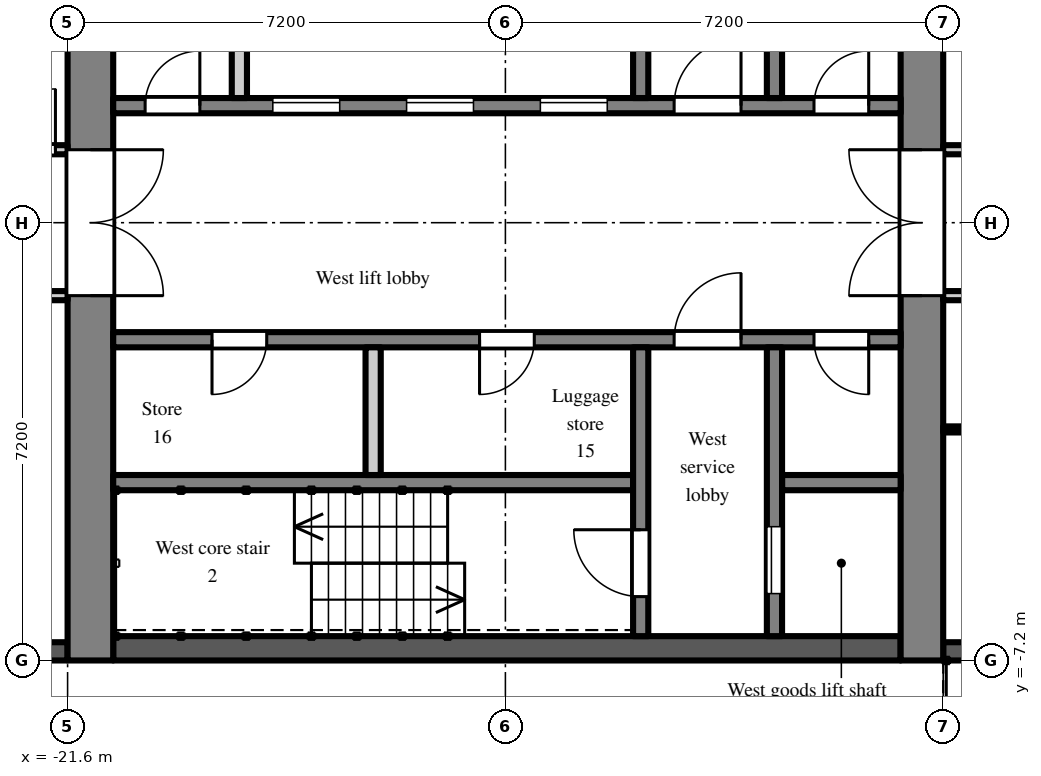
"""IFC4 building model, lengths in metres.
Left out: names, types, materials, properties, quantities, classifications, styles, units other than length and angle.
Written with IfcOpenShell. Run it as: python <this file> out.ifc"""

import sys

from ifc_helpers import new_model, si_unit, direction, frame, frame_2d, origin, place, context, subcontext, project, spatial, rectangle, extrude, element, fill, save


model = new_model("IFC4")
c1 = context("Model", 3, precision=1e-05, world=origin(), true_north=direction((0.0, 1.0)))
c2 = subcontext(c1, "Body", "Model", "MODEL_VIEW")
j1 = project(units=[si_unit("LENGTHUNIT", "METRE"), si_unit("PLANEANGLEUNIT", "RADIAN")], contexts=[c1])
p1 = place(None, origin())
s1 = spatial("IfcSite", under=j1, at=p1, CompositionType="ELEMENT")
p2 = place(p1, origin())
s2 = spatial("IfcBuilding", under=s1, at=p2, CompositionType="ELEMENT")
p3 = place(p2, frame((0.0, 0.0, 201.9)))
s3 = spatial("IfcBuildingStorey", under=s2, at=p3, CompositionType="ELEMENT", Elevation=201.9)
p4 = place(p3, frame((-24.3, -7.05, 0.0), z_axis=(0.0, 0.0, 1.0), x_axis=(1.0, 0.0, 0.0)))
e1 = element("IfcWall", 1, at=p4, inside=s3, PredefinedType="SOLIDWALL", context=c2, shape_type="SweptSolid", body=[
    extrude(rectangle(XDim=2.7, YDim=0.3, at=frame_2d((1.35, 0.0))), origin(), (0.0, 0.0, 1.0), 2.3),
])
p5 = place(p4, frame((0.75, 0.0, 0.2)))
e2 = element("IfcOpeningElement", 2, at=p5, cuts=e1, PredefinedType="OPENING", context=c2, shape_type="SweptSolid", body=[
    extrude(rectangle(XDim=1.2, YDim=1.85, at=frame_2d((0.6, 0.925))), frame((0.0, 0.16, 0.0), z_axis=(0.0, -1.0, 0.0), x_axis=(1.0, 0.0, 0.0)), (0.0, 0.0, 1.0), 0.32),
])
p6 = place(p3, frame((-7.2, -7.05, 0.0), z_axis=(0.0, 0.0, 1.0), x_axis=(1.0, 0.0, 0.0)))
e3 = element("IfcWall", 3, at=p6, inside=s3, PredefinedType="SOLIDWALL", context=c2, shape_type="SweptSolid", body=[
    extrude(rectangle(XDim=3.0, YDim=0.3, at=frame_2d((1.5, 0.0))), origin(), (0.0, 0.0, 1.0), 2.3),
])
p7 = place(p3, frame((-7.55, -7.2, 0.0), z_axis=(0.0, 0.0, 1.0), x_axis=(0.0, 1.0, 0.0)))
e4 = element("IfcWall", 4, at=p7, inside=s3, PredefinedType="SHEAR", context=c2, shape_type="SweptSolid", body=[
    extrude(rectangle(XDim=14.4, YDim=0.7, at=frame_2d((7.2, 0.0))), origin(), (0.0, 0.0, 1.0), 2.6),
])
p8 = place(p7, frame((6.0, 0.0, 0.0)))
e5 = element("IfcOpeningElement", 5, at=p8, cuts=e4, PredefinedType="OPENING", context=c2, shape_type="SweptSolid", body=[
    extrude(rectangle(XDim=2.4, YDim=2.2, at=frame_2d((1.2, 1.1))), frame((0.0, 0.36, 0.0), z_axis=(0.0, -1.0, 0.0), x_axis=(1.0, 0.0, 0.0)), (0.0, 0.0, 1.0), 0.72),
])
p9 = place(p3, frame((-21.225, -7.2, 0.0), z_axis=(0.0, 0.0, 1.0), x_axis=(0.0, 1.0, 0.0)))
e6 = element("IfcWall", 6, at=p9, inside=s3, PredefinedType="SHEAR", context=c2, shape_type="SweptSolid", body=[
    extrude(rectangle(XDim=14.4, YDim=0.75, at=frame_2d((7.2, 0.0))), origin(), (0.0, 0.0, 1.0), 2.6),
])
p10 = place(p9, frame((6.0, 0.0, 0.0)))
e7 = element("IfcOpeningElement", 7, at=p10, cuts=e6, PredefinedType="OPENING", context=c2, shape_type="SweptSolid", body=[
    extrude(rectangle(XDim=2.4, YDim=2.2, at=frame_2d((1.2, 1.1))), frame((0.0, 0.385, 0.0), z_axis=(0.0, -1.0, 0.0), x_axis=(1.0, 0.0, 0.0)), (0.0, 0.0, 1.0), 0.77),
])
p11 = place(p3, frame((-7.9, 1.925, 0.0), z_axis=(0.0, 0.0, 1.0), x_axis=(-1.0, 0.0, 0.0)))
e8 = element("IfcWall", 8, at=p11, inside=s3, PredefinedType="SHEAR", context=c2, shape_type="SweptSolid", body=[
    extrude(rectangle(XDim=12.95, YDim=0.25, at=frame_2d((6.475, 0.0))), origin(), (0.0, 0.0, 1.0), 2.6),
])
p12 = place(p11, frame((4.825, 0.0, 0.0)))
e9 = element("IfcOpeningElement", 9, at=p12, cuts=e8, PredefinedType="OPENING", context=c2, shape_type="SweptSolid", body=[
    extrude(rectangle(XDim=1.1, YDim=2.1, at=frame_2d((0.55, 1.05))), frame((0.0, 0.135, 0.0), z_axis=(0.0, -1.0, 0.0), x_axis=(1.0, 0.0, 0.0)), (0.0, 0.0, 1.0), 0.27),
])
p13 = place(p11, frame((7.025, 0.0, 0.0)))
e10 = element("IfcOpeningElement", 10, at=p13, cuts=e8, PredefinedType="OPENING", context=c2, shape_type="SweptSolid", body=[
    extrude(rectangle(XDim=1.1, YDim=2.1, at=frame_2d((0.55, 1.05))), frame((0.0, 0.135, 0.0), z_axis=(0.0, -1.0, 0.0), x_axis=(1.0, 0.0, 0.0)), (0.0, 0.0, 1.0), 0.27),
])
p14 = place(p11, frame((9.225, 0.0, 0.0)))
e11 = element("IfcOpeningElement", 11, at=p14, cuts=e8, PredefinedType="OPENING", context=c2, shape_type="SweptSolid", body=[
    extrude(rectangle(XDim=1.1, YDim=2.1, at=frame_2d((0.55, 1.05))), frame((0.0, 0.135, 0.0), z_axis=(0.0, -1.0, 0.0), x_axis=(1.0, 0.0, 0.0)), (0.0, 0.0, 1.0), 0.27),
])
p15 = place(p11, frame((0.525, 0.0, 0.0)))
e12 = element("IfcOpeningElement", 12, at=p15, cuts=e8, PredefinedType="OPENING", context=c2, shape_type="SweptSolid", body=[
    extrude(rectangle(XDim=0.9, YDim=2.1, at=frame_2d((0.45, 1.05))), frame((0.0, 0.135, 0.0), z_axis=(0.0, -1.0, 0.0), x_axis=(1.0, 0.0, 0.0)), (0.0, 0.0, 1.0), 0.27),
])
p16 = place(p11, frame((2.625, 0.0, 0.0)))
e13 = element("IfcOpeningElement", 13, at=p16, cuts=e8, PredefinedType="OPENING", context=c2, shape_type="SweptSolid", body=[
    extrude(rectangle(XDim=1.1, YDim=2.1, at=frame_2d((0.55, 1.05))), frame((0.0, 0.135, 0.0), z_axis=(0.0, -1.0, 0.0), x_axis=(1.0, 0.0, 0.0)), (0.0, 0.0, 1.0), 0.27),
])
p17 = place(p11, frame((11.525, 0.0, 0.0)))
e14 = element("IfcOpeningElement", 14, at=p17, cuts=e8, PredefinedType="OPENING", context=c2, shape_type="SweptSolid", body=[
    extrude(rectangle(XDim=0.9, YDim=2.1, at=frame_2d((0.45, 1.05))), frame((0.0, 0.135, 0.0), z_axis=(0.0, -1.0, 0.0), x_axis=(1.0, 0.0, 0.0)), (0.0, 0.0, 1.0), 0.27),
])
p18 = place(p3, frame((-9.975, 2.05, 0.0), z_axis=(0.0, 0.0, 1.0), x_axis=(0.0, 1.0, 0.0)))
e15 = element("IfcWall", 15, at=p18, inside=s3, PredefinedType="SHEAR", context=c2, shape_type="SweptSolid", body=[
    extrude(rectangle(XDim=4.75, YDim=0.25, at=frame_2d((2.375, 0.0))), origin(), (0.0, 0.0, 1.0), 2.6),
])
p19 = place(p18, frame((2.95, 0.0, 0.0)))
e16 = element("IfcOpeningElement", 16, at=p19, cuts=e15, PredefinedType="OPENING", context=c2, shape_type="SweptSolid", body=[
    extrude(rectangle(XDim=1.1, YDim=2.1, at=frame_2d((0.55, 1.05))), frame((0.0, 0.135, 0.0), z_axis=(0.0, -1.0, 0.0), x_axis=(1.0, 0.0, 0.0)), (0.0, 0.0, 1.0), 0.27),
])
p20 = place(p3, frame((-12.175, 2.05, 0.0), z_axis=(0.0, 0.0, 1.0), x_axis=(0.0, 1.0, 0.0)))
e17 = element("IfcWall", 17, at=p20, inside=s3, PredefinedType="SHEAR", context=c2, shape_type="SweptSolid", body=[
    extrude(rectangle(XDim=4.75, YDim=0.25, at=frame_2d((2.375, 0.0))), origin(), (0.0, 0.0, 1.0), 2.6),
])
p21 = place(p20, frame((3.0, 0.0, 0.0)))
e18 = element("IfcOpeningElement", 18, at=p21, cuts=e17, PredefinedType="OPENING", context=c2, shape_type="SweptSolid", body=[
    extrude(rectangle(XDim=1.1, YDim=2.1, at=frame_2d((0.55, 1.05))), frame((0.0, 0.135, 0.0), z_axis=(0.0, -1.0, 0.0), x_axis=(1.0, 0.0, 0.0)), (0.0, 0.0, 1.0), 0.27),
])
p22 = place(p3, frame((-18.775, 2.05, 0.0), z_axis=(0.0, 0.0, 1.0), x_axis=(0.0, 1.0, 0.0)))
e19 = element("IfcWall", 19, at=p22, inside=s3, PredefinedType="PARTITIONING", context=c2, shape_type="SweptSolid", body=[
    extrude(rectangle(XDim=2.1, YDim=0.25, at=frame_2d((1.05, 0.0))), origin(), (0.0, 0.0, 1.0), 2.6),
])
p23 = place(p3, frame((-7.9, -7.0, 0.0), z_axis=(0.0, 0.0, 1.0), x_axis=(-1.0, 0.0, 0.0)))
e20 = element("IfcWall", 20, at=p23, inside=s3, PredefinedType="SHEAR", context=c2, shape_type="SweptSolid", body=[
    extrude(rectangle(XDim=12.95, YDim=0.4, at=frame_2d((6.475, 0.0))), origin(), (0.0, 0.0, 1.0), 2.6),
])
p24 = place(p3, frame((-7.9, -1.925, 0.0), z_axis=(0.0, 0.0, 1.0), x_axis=(-1.0, 0.0, 0.0)))
e21 = element("IfcWall", 21, at=p24, inside=s3, PredefinedType="SHEAR", context=c2, shape_type="SweptSolid", body=[
    extrude(rectangle(XDim=12.95, YDim=0.25, at=frame_2d((6.475, 0.0))), origin(), (0.0, 0.0, 1.0), 2.6),
])
p25 = place(p24, frame((0.525, 0.0, 0.0)))
e22 = element("IfcOpeningElement", 22, at=p25, cuts=e21, PredefinedType="OPENING", context=c2, shape_type="SweptSolid", body=[
    extrude(rectangle(XDim=0.9, YDim=2.1, at=frame_2d((0.45, 1.05))), frame((0.0, 0.135, 0.0), z_axis=(0.0, -1.0, 0.0), x_axis=(1.0, 0.0, 0.0)), (0.0, 0.0, 1.0), 0.27),
])
p26 = place(p24, frame((2.625, 0.0, 0.0)))
e23 = element("IfcOpeningElement", 23, at=p26, cuts=e21, PredefinedType="OPENING", context=c2, shape_type="SweptSolid", body=[
    extrude(rectangle(XDim=1.1, YDim=2.1, at=frame_2d((0.55, 1.05))), frame((0.0, 0.135, 0.0), z_axis=(0.0, -1.0, 0.0), x_axis=(1.0, 0.0, 0.0)), (0.0, 0.0, 1.0), 0.27),
])
p27 = place(p24, frame((6.025, 0.0, 0.0)))
e24 = element("IfcOpeningElement", 24, at=p27, cuts=e21, PredefinedType="OPENING", context=c2, shape_type="SweptSolid", body=[
    extrude(rectangle(XDim=0.9, YDim=2.1, at=frame_2d((0.45, 1.05))), frame((0.0, 0.135, 0.0), z_axis=(0.0, -1.0, 0.0), x_axis=(1.0, 0.0, 0.0)), (0.0, 0.0, 1.0), 0.27),
])
p28 = place(p24, frame((10.425, 0.0, 0.0)))
e25 = element("IfcOpeningElement", 25, at=p28, cuts=e21, PredefinedType="OPENING", context=c2, shape_type="SweptSolid", body=[
    extrude(rectangle(XDim=0.9, YDim=2.1, at=frame_2d((0.45, 1.05))), frame((0.0, 0.135, 0.0), z_axis=(0.0, -1.0, 0.0), x_axis=(1.0, 0.0, 0.0)), (0.0, 0.0, 1.0), 0.27),
])
p29 = place(p3, frame((-7.9, -4.275, 0.0), z_axis=(0.0, 0.0, 1.0), x_axis=(-1.0, 0.0, 0.0)))
e26 = element("IfcWall", 26, at=p29, inside=s3, PredefinedType="SHEAR", context=c2, shape_type="SweptSolid", body=[
    extrude(rectangle(XDim=1.95, YDim=0.25, at=frame_2d((0.975, 0.0))), origin(), (0.0, 0.0, 1.0), 2.6),
])
p30 = place(p3, frame((-12.3, -4.275, 0.0), z_axis=(0.0, 0.0, 1.0), x_axis=(-1.0, 0.0, 0.0)))
e27 = element("IfcWall", 27, at=p30, inside=s3, PredefinedType="SHEAR", context=c2, shape_type="SweptSolid", body=[
    extrude(rectangle(XDim=8.55, YDim=0.25, at=frame_2d((4.275, 0.0))), origin(), (0.0, 0.0, 1.0), 2.6),
])
p31 = place(p3, frame((-9.975, -2.05, 0.0), z_axis=(0.0, 0.0, 1.0), x_axis=(0.0, -1.0, 0.0)))
e28 = element("IfcWall", 28, at=p31, inside=s3, PredefinedType="SHEAR", context=c2, shape_type="SweptSolid", body=[
    extrude(rectangle(XDim=4.75, YDim=0.25, at=frame_2d((2.375, 0.0))), origin(), (0.0, 0.0, 1.0), 2.6),
])
p32 = place(p31, frame((2.95, 0.0, 0.0)))
e29 = element("IfcOpeningElement", 29, at=p32, cuts=e28, PredefinedType="OPENING", context=c2, shape_type="SweptSolid", body=[
    extrude(rectangle(XDim=1.1, YDim=2.1, at=frame_2d((0.55, 1.05))), frame((0.0, 0.135, 0.0), z_axis=(0.0, -1.0, 0.0), x_axis=(1.0, 0.0, 0.0)), (0.0, 0.0, 1.0), 0.27),
])
p33 = place(p3, frame((-12.175, -2.05, 0.0), z_axis=(0.0, 0.0, 1.0), x_axis=(0.0, -1.0, 0.0)))
e30 = element("IfcWall", 30, at=p33, inside=s3, PredefinedType="SHEAR", context=c2, shape_type="SweptSolid", body=[
    extrude(rectangle(XDim=4.75, YDim=0.25, at=frame_2d((2.375, 0.0))), origin(), (0.0, 0.0, 1.0), 2.6),
])
p34 = place(p33, frame((3.0, 0.0, 0.0)))
e31 = element("IfcOpeningElement", 31, at=p34, cuts=e30, PredefinedType="OPENING", context=c2, shape_type="SweptSolid", body=[
    extrude(rectangle(XDim=1.1, YDim=2.1, at=frame_2d((0.55, 1.05))), frame((0.0, 0.135, 0.0), z_axis=(0.0, -1.0, 0.0), x_axis=(1.0, 0.0, 0.0)), (0.0, 0.0, 1.0), 0.27),
])
p35 = place(p3, frame((-16.575, -2.05, 0.0), z_axis=(0.0, 0.0, 1.0), x_axis=(0.0, -1.0, 0.0)))
e32 = element("IfcWall", 32, at=p35, inside=s3, PredefinedType="PARTITIONING", context=c2, shape_type="SweptSolid", body=[
    extrude(rectangle(XDim=2.1, YDim=0.25, at=frame_2d((1.05, 0.0))), origin(), (0.0, 0.0, 1.0), 2.6),
])
p36 = place(p3, frame((-25.125, -1.2, 0.0), z_axis=(0.0, 0.0, 1.0), x_axis=(1.0, 0.0, 0.0)))
e33 = element("IfcWall", 33, at=p36, inside=s3, PredefinedType="PARTITIONING", context=c2, shape_type="SweptSolid", body=[
    extrude(rectangle(XDim=3.525, YDim=0.15, at=frame_2d((1.762, 0.0))), origin(), (0.0, 0.0, 1.0), 2.6),
])
p37 = place(p36, frame((1.925, 0.0, 0.0)))
e34 = element("IfcOpeningElement", 34, at=p37, cuts=e33, PredefinedType="OPENING", context=c2, shape_type="SweptSolid", body=[
    extrude(rectangle(XDim=1.0, YDim=2.1, at=frame_2d((0.5, 1.05))), frame((0.0, 0.085, 0.0), z_axis=(0.0, -1.0, 0.0), x_axis=(1.0, 0.0, 0.0)), (0.0, 0.0, 1.0), 0.17),
])
p38 = place(p3, frame((-25.125, 1.2, 0.0), z_axis=(0.0, 0.0, 1.0), x_axis=(1.0, 0.0, 0.0)))
e35 = element("IfcWall", 35, at=p38, inside=s3, PredefinedType="PARTITIONING", context=c2, shape_type="SweptSolid", body=[
    extrude(rectangle(XDim=3.525, YDim=0.15, at=frame_2d((1.762, 0.0))), origin(), (0.0, 0.0, 1.0), 2.6),
])
p39 = place(p38, frame((2.325, 0.0, 0.0)))
e36 = element("IfcOpeningElement", 36, at=p39, cuts=e35, PredefinedType="OPENING", context=c2, shape_type="SweptSolid", body=[
    extrude(rectangle(XDim=1.0, YDim=2.1, at=frame_2d((0.5, 1.05))), frame((0.0, 0.085, 0.0), z_axis=(0.0, -1.0, 0.0), x_axis=(1.0, 0.0, 0.0)), (0.0, 0.0, 1.0), 0.17),
])
p40 = place(p3, frame((-7.2, -3.4, 0.0), z_axis=(0.0, 0.0, 1.0), x_axis=(1.0, 0.0, 0.0)))
e37 = element("IfcWall", 37, at=p40, inside=s3, PredefinedType="PARTITIONING", context=c2, shape_type="SweptSolid", body=[
    extrude(rectangle(XDim=5.925, YDim=0.1, at=frame_2d((2.962, 0.0))), origin(), (0.0, 0.0, 1.0), 2.6),
])
p41 = place(p3, frame((-7.2, -1.2, 0.0), z_axis=(0.0, 0.0, 1.0), x_axis=(1.0, 0.0, 0.0)))
e38 = element("IfcWall", 38, at=p41, inside=s3, PredefinedType="PARTITIONING", context=c2, shape_type="SweptSolid", body=[
    extrude(rectangle(XDim=6.075, YDim=0.15, at=frame_2d((3.038, 0.0))), origin(), (0.0, 0.0, 1.0), 2.6),
])
p42 = place(p41, frame((2.55, 0.0, 0.0)))
e39 = element("IfcOpeningElement", 39, at=p42, cuts=e38, PredefinedType="OPENING", context=c2, shape_type="SweptSolid", body=[
    extrude(rectangle(XDim=0.9, YDim=2.1, at=frame_2d((0.45, 1.05))), frame((0.0, 0.085, 0.0), z_axis=(0.0, -1.0, 0.0), x_axis=(1.0, 0.0, 0.0)), (0.0, 0.0, 1.0), 0.17),
])
p43 = place(p3, frame((-7.2, 1.2, 0.0), z_axis=(0.0, 0.0, 1.0), x_axis=(1.0, 0.0, 0.0)))
e40 = element("IfcWall", 40, at=p43, inside=s3, PredefinedType="PARTITIONING", context=c2, shape_type="SweptSolid", body=[
    extrude(rectangle(XDim=6.075, YDim=0.15, at=frame_2d((3.038, 0.0))), origin(), (0.0, 0.0, 1.0), 2.6),
])
p44 = place(p43, frame((2.55, 0.0, 0.0)))
e41 = element("IfcOpeningElement", 41, at=p44, cuts=e40, PredefinedType="OPENING", context=c2, shape_type="SweptSolid", body=[
    extrude(rectangle(XDim=0.9, YDim=2.1, at=frame_2d((0.45, 1.05))), frame((0.0, 0.085, 0.0), z_axis=(0.0, -1.0, 0.0), x_axis=(1.0, 0.0, 0.0)), (0.0, 0.0, 1.0), 0.17),
])
p45 = place(p43, frame((0.55, 0.0, 0.0)))
e42 = element("IfcOpeningElement", 42, at=p45, cuts=e40, PredefinedType="OPENING", context=c2, shape_type="SweptSolid", body=[
    extrude(rectangle(XDim=0.9, YDim=2.1, at=frame_2d((0.45, 1.05))), frame((0.0, 0.085, 0.0), z_axis=(0.0, -1.0, 0.0), x_axis=(1.0, 0.0, 0.0)), (0.0, 0.0, 1.0), 0.17),
])
p46 = place(p12, origin())
e43 = element("IfcDoor", 43, at=p46, inside=s3, OperationType="SLIDING_TO_LEFT", PredefinedType="DOOR", context=c2, shape_type="SweptSolid", body=[
    extrude(rectangle(XDim=1.1, YDim=2.1, at=frame_2d((0.55, 1.05))), frame((0.0, 0.025, 0.0), z_axis=(0.0, -1.0, 0.0), x_axis=(1.0, 0.0, 0.0)), (0.0, 0.0, 1.0), 0.05),
])
fill(e9, e43)
p47 = place(p13, origin())
e44 = element("IfcDoor", 44, at=p47, inside=s3, OperationType="SLIDING_TO_LEFT", PredefinedType="DOOR", context=c2, shape_type="SweptSolid", body=[
    extrude(rectangle(XDim=1.1, YDim=2.1, at=frame_2d((0.55, 1.05))), frame((0.0, 0.025, 0.0), z_axis=(0.0, -1.0, 0.0), x_axis=(1.0, 0.0, 0.0)), (0.0, 0.0, 1.0), 0.05),
])
fill(e10, e44)
p48 = place(p14, origin())
e45 = element("IfcDoor", 45, at=p48, inside=s3, OperationType="SLIDING_TO_LEFT", PredefinedType="DOOR", context=c2, shape_type="SweptSolid", body=[
    extrude(rectangle(XDim=1.1, YDim=2.1, at=frame_2d((0.55, 1.05))), frame((0.0, 0.025, 0.0), z_axis=(0.0, -1.0, 0.0), x_axis=(1.0, 0.0, 0.0)), (0.0, 0.0, 1.0), 0.05),
])
fill(e11, e45)
p49 = place(p32, origin())
e46 = element("IfcDoor", 46, at=p49, inside=s3, OperationType="SLIDING_TO_LEFT", PredefinedType="DOOR", context=c2, shape_type="SweptSolid", body=[
    extrude(rectangle(XDim=1.1, YDim=2.1, at=frame_2d((0.55, 1.05))), frame((0.0, 0.025, 0.0), z_axis=(0.0, -1.0, 0.0), x_axis=(1.0, 0.0, 0.0)), (0.0, 0.0, 1.0), 0.05),
])
fill(e29, e46)
p50 = place(p34, frame((1.1, 0.0, 0.0), z_axis=(0.0, 0.0, 1.0), x_axis=(-1.0, 0.0, 0.0)))
e47 = element("IfcDoor", 47, at=p50, inside=s3, OperationType="SINGLE_SWING_RIGHT", PredefinedType="DOOR", context=c2, shape_type="SweptSolid", body=[
    extrude(rectangle(XDim=1.1, YDim=2.1, at=frame_2d((0.55, 1.05))), frame((0.0, 0.025, 0.0), z_axis=(0.0, -1.0, 0.0), x_axis=(1.0, 0.0, 0.0)), (0.0, 0.0, 1.0), 0.05),
])
fill(e31, e47)
p51 = place(p15, frame((0.9, 0.0, 0.0), z_axis=(0.0, 0.0, 1.0), x_axis=(-1.0, 0.0, 0.0)))
e48 = element("IfcDoor", 48, at=p51, inside=s3, OperationType="SINGLE_SWING_RIGHT", PredefinedType="DOOR", context=c2, shape_type="SweptSolid", body=[
    extrude(rectangle(XDim=0.9, YDim=2.1, at=frame_2d((0.45, 1.05))), frame((0.0, 0.025, 0.0), z_axis=(0.0, -1.0, 0.0), x_axis=(1.0, 0.0, 0.0)), (0.0, 0.0, 1.0), 0.05),
])
fill(e12, e48)
p52 = place(p25, origin())
e49 = element("IfcDoor", 49, at=p52, inside=s3, OperationType="SINGLE_SWING_LEFT", PredefinedType="DOOR", context=c2, shape_type="SweptSolid", body=[
    extrude(rectangle(XDim=0.9, YDim=2.1, at=frame_2d((0.45, 1.05))), frame((0.0, 0.025, 0.0), z_axis=(0.0, -1.0, 0.0), x_axis=(1.0, 0.0, 0.0)), (0.0, 0.0, 1.0), 0.05),
])
fill(e22, e49)
p53 = place(p16, frame((1.1, 0.0, 0.0), z_axis=(0.0, 0.0, 1.0), x_axis=(-1.0, 0.0, 0.0)))
e50 = element("IfcDoor", 50, at=p53, inside=s3, OperationType="SINGLE_SWING_RIGHT", PredefinedType="DOOR", context=c2, shape_type="SweptSolid", body=[
    extrude(rectangle(XDim=1.1, YDim=2.1, at=frame_2d((0.55, 1.05))), frame((0.0, 0.025, 0.0), z_axis=(0.0, -1.0, 0.0), x_axis=(1.0, 0.0, 0.0)), (0.0, 0.0, 1.0), 0.05),
])
fill(e13, e50)
p54 = place(p26, frame((1.1, 0.0, 0.0), z_axis=(0.0, 0.0, 1.0), x_axis=(-1.0, 0.0, 0.0)))
e51 = element("IfcDoor", 51, at=p54, inside=s3, OperationType="SINGLE_SWING_RIGHT", PredefinedType="DOOR", context=c2, shape_type="SweptSolid", body=[
    extrude(rectangle(XDim=1.1, YDim=2.1, at=frame_2d((0.55, 1.05))), frame((0.0, 0.025, 0.0), z_axis=(0.0, -1.0, 0.0), x_axis=(1.0, 0.0, 0.0)), (0.0, 0.0, 1.0), 0.05),
])
fill(e23, e51)
p55 = place(p8, origin())
e52 = element("IfcDoor", 52, at=p55, inside=s3, OperationType="DOUBLE_DOOR_DOUBLE_SWING", PredefinedType="DOOR", context=c2, shape_type="SweptSolid", body=[
    extrude(rectangle(XDim=2.4, YDim=2.2, at=frame_2d((1.2, 1.1))), frame((0.0, 0.025, 0.0), z_axis=(0.0, -1.0, 0.0), x_axis=(1.0, 0.0, 0.0)), (0.0, 0.0, 1.0), 0.05),
])
fill(e5, e52)
p56 = place(p10, frame((2.4, 0.0, 0.0), z_axis=(0.0, 0.0, 1.0), x_axis=(-1.0, 0.0, 0.0)))
e53 = element("IfcDoor", 53, at=p56, inside=s3, OperationType="DOUBLE_DOOR_DOUBLE_SWING", PredefinedType="DOOR", context=c2, shape_type="SweptSolid", body=[
    extrude(rectangle(XDim=2.4, YDim=2.2, at=frame_2d((1.2, 1.1))), frame((0.0, 0.025, 0.0), z_axis=(0.0, -1.0, 0.0), x_axis=(1.0, 0.0, 0.0)), (0.0, 0.0, 1.0), 0.05),
])
fill(e7, e53)
p57 = place(p17, frame((0.9, 0.0, 0.0), z_axis=(0.0, 0.0, 1.0), x_axis=(-1.0, 0.0, 0.0)))
e54 = element("IfcDoor", 54, at=p57, inside=s3, OperationType="SINGLE_SWING_RIGHT", PredefinedType="DOOR", context=c2, shape_type="SweptSolid", body=[
    extrude(rectangle(XDim=0.9, YDim=2.1, at=frame_2d((0.45, 1.05))), frame((0.0, 0.025, 0.0), z_axis=(0.0, -1.0, 0.0), x_axis=(1.0, 0.0, 0.0)), (0.0, 0.0, 1.0), 0.05),
])
fill(e14, e54)
p58 = place(p27, origin())
e55 = element("IfcDoor", 55, at=p58, inside=s3, OperationType="SINGLE_SWING_RIGHT", PredefinedType="DOOR", context=c2, shape_type="SweptSolid", body=[
    extrude(rectangle(XDim=0.9, YDim=2.1, at=frame_2d((0.45, 1.05))), frame((0.0, 0.025, 0.0), z_axis=(0.0, -1.0, 0.0), x_axis=(1.0, 0.0, 0.0)), (0.0, 0.0, 1.0), 0.05),
])
fill(e24, e55)
p59 = place(p28, origin())
e56 = element("IfcDoor", 56, at=p59, inside=s3, OperationType="SINGLE_SWING_RIGHT", PredefinedType="DOOR", context=c2, shape_type="SweptSolid", body=[
    extrude(rectangle(XDim=0.9, YDim=2.1, at=frame_2d((0.45, 1.05))), frame((0.0, 0.025, 0.0), z_axis=(0.0, -1.0, 0.0), x_axis=(1.0, 0.0, 0.0)), (0.0, 0.0, 1.0), 0.05),
])
fill(e25, e56)
p60 = place(p39, origin())
e57 = element("IfcDoor", 57, at=p60, inside=s3, OperationType="SINGLE_SWING_RIGHT", PredefinedType="DOOR", context=c2, shape_type="SweptSolid", body=[
    extrude(rectangle(XDim=1.0, YDim=2.1, at=frame_2d((0.5, 1.05))), frame((0.0, 0.025, 0.0), z_axis=(0.0, -1.0, 0.0), x_axis=(1.0, 0.0, 0.0)), (0.0, 0.0, 1.0), 0.05),
])
fill(e36, e57)
save(model, sys.argv[1])
